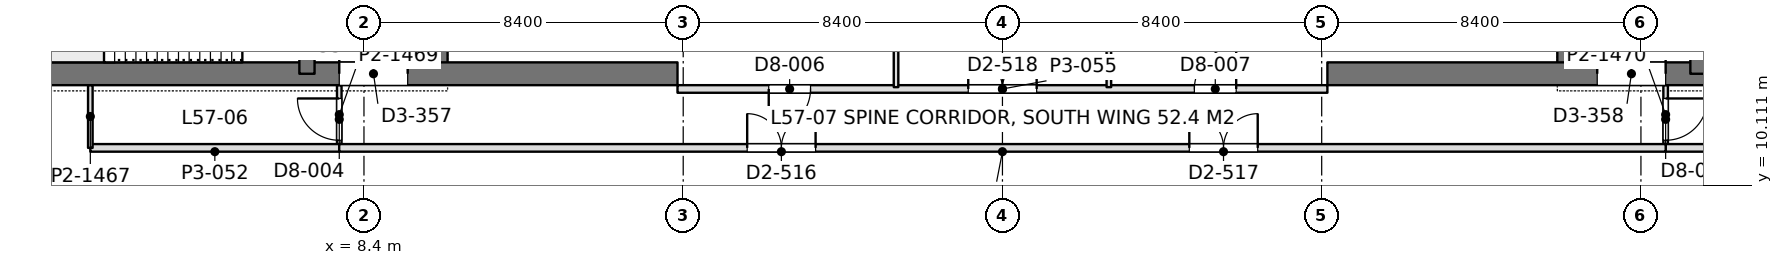
"""IFC4 building model, lengths in metres.
Left out: names, types, materials, properties, quantities, classifications, styles, units other than length and angle.
Written with IfcOpenShell. Run it as: python <this file> out.ifc"""

import sys

from ifc_helpers import new_model, si_unit, direction, frame, frame_2d, origin, place, context, subcontext, project, spatial, rectangle, extrude, element, fill, save


model = new_model("IFC4")
c1 = context("Model", 3, precision=1e-05, world=origin(), true_north=direction((0.0, 1.0)))
c2 = subcontext(c1, "Body", "Model", "MODEL_VIEW")
j1 = project(units=[si_unit("LENGTHUNIT", "METRE"), si_unit("PLANEANGLEUNIT", "RADIAN")], contexts=[c1])
p1 = place(None, origin())
s1 = spatial("IfcSite", under=j1, at=p1, CompositionType="ELEMENT")
p2 = place(p1, origin())
s2 = spatial("IfcBuilding", under=s1, at=p2, CompositionType="ELEMENT")
p3 = place(p2, frame((0.0, 0.0, 250.2)))
s3 = spatial("IfcBuildingStorey", under=s2, at=p3, CompositionType="ELEMENT", Elevation=250.2)
p4 = place(p3, frame((-1.05, 13.05, 0.0), z_axis=(0.0, 0.0, 1.0), x_axis=(1.0, 0.0, 0.0)))
e1 = element("IfcWall", 1, at=p4, inside=s3, PredefinedType="SHEAR", context=c2, shape_type="SweptSolid", body=[
    extrude(rectangle(XDim=17.7, YDim=0.6, at=frame_2d((8.85, 0.0))), origin(), (0.0, 0.0, 1.0), 4.5),
])
p5 = place(p4, frame((8.8, 0.0, 0.0)))
e2 = element("IfcOpeningElement", 2, at=p5, cuts=e1, PredefinedType="OPENING", context=c2, shape_type="SweptSolid", body=[
    extrude(rectangle(XDim=1.8, YDim=2.4, at=frame_2d((0.9, 1.2))), frame((0.0, 0.31, 0.0), z_axis=(0.0, -1.0, 0.0), x_axis=(1.0, 0.0, 0.0)), (0.0, 0.0, 1.0), 0.62),
])
p6 = place(p3, frame((6.9, 13.05, 0.0), z_axis=(0.0, 0.0, 1.0), x_axis=(0.0, 1.0, 0.0)))
e3 = element("IfcWall", 3, at=p6, inside=s3, PredefinedType="SHEAR", context=c2, shape_type="SweptSolid", body=[
    extrude(rectangle(XDim=24.3, YDim=0.4, at=frame_2d((12.15, 0.0))), origin(), (0.0, 0.0, 1.0), 4.5),
])
p7 = place(p6, frame((1.3, 0.0, 0.0)))
e4 = element("IfcOpeningElement", 4, at=p7, cuts=e3, PredefinedType="OPENING", context=c2, shape_type="SweptSolid", body=[
    extrude(rectangle(XDim=1.0, YDim=2.2, at=frame_2d((0.5, 1.1))), frame((0.0, 0.21, 0.0), z_axis=(0.0, -1.0, 0.0), x_axis=(1.0, 0.0, 0.0)), (0.0, 0.0, 1.0), 0.42),
])
p8 = place(p6, frame((22.0, 0.0, 0.0)))
e5 = element("IfcOpeningElement", 5, at=p8, cuts=e3, PredefinedType="OPENING", context=c2, shape_type="SweptSolid", body=[
    extrude(rectangle(XDim=1.0, YDim=2.2, at=frame_2d((0.5, 1.1))), frame((0.0, 0.21, 0.0), z_axis=(0.0, -1.0, 0.0), x_axis=(1.0, 0.0, 0.0)), (0.0, 0.0, 1.0), 0.42),
])
p9 = place(p6, frame((5.55, 0.0, 0.0)))
e6 = element("IfcOpeningElement", 6, at=p9, cuts=e3, PredefinedType="OPENING", context=c2, shape_type="SweptSolid", body=[
    extrude(rectangle(XDim=1.0, YDim=2.2, at=frame_2d((0.5, 1.1))), frame((0.0, 0.21, 0.0), z_axis=(0.0, -1.0, 0.0), x_axis=(1.0, 0.0, 0.0)), (0.0, 0.0, 1.0), 0.42),
])
p10 = place(p6, frame((9.55, 0.0, 0.0)))
e7 = element("IfcOpeningElement", 7, at=p10, cuts=e3, PredefinedType="OPENING", context=c2, shape_type="SweptSolid", body=[
    extrude(rectangle(XDim=1.0, YDim=2.2, at=frame_2d((0.5, 1.1))), frame((0.0, 0.21, 0.0), z_axis=(0.0, -1.0, 0.0), x_axis=(1.0, 0.0, 0.0)), (0.0, 0.0, 1.0), 0.42),
])
p11 = place(p6, frame((12.8, 0.0, 0.0)))
e8 = element("IfcOpeningElement", 8, at=p11, cuts=e3, PredefinedType="OPENING", context=c2, shape_type="SweptSolid", body=[
    extrude(rectangle(XDim=1.1, YDim=2.2, at=frame_2d((0.55, 1.1))), frame((0.0, 0.21, 0.0), z_axis=(0.0, -1.0, 0.0), x_axis=(1.0, 0.0, 0.0)), (0.0, 0.0, 1.0), 0.42),
])
p12 = place(p6, frame((15.538, 0.0, 0.0)))
e9 = element("IfcOpeningElement", 9, at=p12, cuts=e3, PredefinedType="OPENING", context=c2, shape_type="SweptSolid", body=[
    extrude(rectangle(XDim=1.1, YDim=2.2, at=frame_2d((0.55, 1.1))), frame((0.0, 0.21, 0.0), z_axis=(0.0, -1.0, 0.0), x_axis=(1.0, 0.0, 0.0)), (0.0, 0.0, 1.0), 0.42),
])
p13 = place(p6, frame((18.262, 0.0, 0.0)))
e10 = element("IfcOpeningElement", 10, at=p13, cuts=e3, PredefinedType="OPENING", context=c2, shape_type="SweptSolid", body=[
    extrude(rectangle(XDim=1.1, YDim=2.2, at=frame_2d((0.55, 1.1))), frame((0.0, 0.21, 0.0), z_axis=(0.0, -1.0, 0.0), x_axis=(1.0, 0.0, 0.0)), (0.0, 0.0, 1.0), 0.42),
])
p14 = place(p3, frame((10.4, 13.05, 0.0), z_axis=(0.0, 0.0, 1.0), x_axis=(0.0, 1.0, 0.0)))
e11 = element("IfcWall", 11, at=p14, inside=s3, PredefinedType="SHEAR", context=c2, shape_type="SweptSolid", body=[
    extrude(rectangle(XDim=24.3, YDim=0.4, at=frame_2d((12.15, 0.0))), origin(), (0.0, 0.0, 1.0), 4.5),
])
p15 = place(p14, frame((15.75, 0.0, 0.0)))
e12 = element("IfcOpeningElement", 12, at=p15, cuts=e11, PredefinedType="OPENING", context=c2, shape_type="SweptSolid", body=[
    extrude(rectangle(XDim=1.1, YDim=2.2, at=frame_2d((0.55, 1.1))), frame((0.0, 0.21, 0.0), z_axis=(0.0, -1.0, 0.0), x_axis=(1.0, 0.0, 0.0)), (0.0, 0.0, 1.0), 0.42),
])
p16 = place(p14, frame((18.6, 0.0, 0.0)))
e13 = element("IfcOpeningElement", 13, at=p16, cuts=e11, PredefinedType="OPENING", context=c2, shape_type="SweptSolid", body=[
    extrude(rectangle(XDim=1.1, YDim=2.2, at=frame_2d((0.55, 1.1))), frame((0.0, 0.21, 0.0), z_axis=(0.0, -1.0, 0.0), x_axis=(1.0, 0.0, 0.0)), (0.0, 0.0, 1.0), 0.42),
])
p17 = place(p14, frame((21.45, 0.0, 0.0)))
e14 = element("IfcOpeningElement", 14, at=p17, cuts=e11, PredefinedType="OPENING", context=c2, shape_type="SweptSolid", body=[
    extrude(rectangle(XDim=1.1, YDim=2.2, at=frame_2d((0.55, 1.1))), frame((0.0, 0.21, 0.0), z_axis=(0.0, -1.0, 0.0), x_axis=(1.0, 0.0, 0.0)), (0.0, 0.0, 1.0), 0.42),
])
p18 = place(p14, frame((6.05, 0.0, 0.0)))
e15 = element("IfcOpeningElement", 15, at=p18, cuts=e11, PredefinedType="OPENING", context=c2, shape_type="SweptSolid", body=[
    extrude(rectangle(XDim=1.8, YDim=2.4, at=frame_2d((0.9, 1.2))), frame((0.0, 0.21, 0.0), z_axis=(0.0, -1.0, 0.0), x_axis=(1.0, 0.0, 0.0)), (0.0, 0.0, 1.0), 0.42),
])
p19 = place(p14, frame((11.25, 0.0, 0.0)))
e16 = element("IfcOpeningElement", 16, at=p19, cuts=e11, PredefinedType="OPENING", context=c2, shape_type="SweptSolid", body=[
    extrude(rectangle(XDim=1.8, YDim=2.4, at=frame_2d((0.9, 1.2))), frame((0.0, 0.21, 0.0), z_axis=(0.0, -1.0, 0.0), x_axis=(1.0, 0.0, 0.0)), (0.0, 0.0, 1.0), 0.42),
])
p20 = place(p3, frame((33.75, 13.05, 0.0), z_axis=(0.0, 0.0, 1.0), x_axis=(1.0, 0.0, 0.0)))
e17 = element("IfcWall", 17, at=p20, inside=s3, PredefinedType="SHEAR", context=c2, shape_type="SweptSolid", body=[
    extrude(rectangle(XDim=17.7, YDim=0.6, at=frame_2d((8.85, 0.0))), origin(), (0.0, 0.0, 1.0), 4.5),
])
p21 = place(p20, frame((7.1, 0.0, 0.0)))
e18 = element("IfcOpeningElement", 18, at=p21, cuts=e17, PredefinedType="OPENING", context=c2, shape_type="SweptSolid", body=[
    extrude(rectangle(XDim=1.8, YDim=2.4, at=frame_2d((0.9, 1.2))), frame((0.0, 0.31, 0.0), z_axis=(0.0, -1.0, 0.0), x_axis=(1.0, 0.0, 0.0)), (0.0, 0.0, 1.0), 0.62),
])
p22 = place(p3, frame((43.5, 13.05, 0.0), z_axis=(0.0, 0.0, 1.0), x_axis=(0.0, 1.0, 0.0)))
e19 = element("IfcWall", 19, at=p22, inside=s3, PredefinedType="SHEAR", context=c2, shape_type="SweptSolid", body=[
    extrude(rectangle(XDim=24.3, YDim=0.4, at=frame_2d((12.15, 0.0))), origin(), (0.0, 0.0, 1.0), 4.5),
])
p23 = place(p22, frame((1.3, 0.0, 0.0)))
e20 = element("IfcOpeningElement", 20, at=p23, cuts=e19, PredefinedType="OPENING", context=c2, shape_type="SweptSolid", body=[
    extrude(rectangle(XDim=1.0, YDim=2.2, at=frame_2d((0.5, 1.1))), frame((0.0, 0.21, 0.0), z_axis=(0.0, -1.0, 0.0), x_axis=(1.0, 0.0, 0.0)), (0.0, 0.0, 1.0), 0.42),
])
p24 = place(p22, frame((22.0, 0.0, 0.0)))
e21 = element("IfcOpeningElement", 21, at=p24, cuts=e19, PredefinedType="OPENING", context=c2, shape_type="SweptSolid", body=[
    extrude(rectangle(XDim=1.0, YDim=2.2, at=frame_2d((0.5, 1.1))), frame((0.0, 0.21, 0.0), z_axis=(0.0, -1.0, 0.0), x_axis=(1.0, 0.0, 0.0)), (0.0, 0.0, 1.0), 0.42),
])
p25 = place(p22, frame((5.55, 0.0, 0.0)))
e22 = element("IfcOpeningElement", 22, at=p25, cuts=e19, PredefinedType="OPENING", context=c2, shape_type="SweptSolid", body=[
    extrude(rectangle(XDim=1.0, YDim=2.2, at=frame_2d((0.5, 1.1))), frame((0.0, 0.21, 0.0), z_axis=(0.0, -1.0, 0.0), x_axis=(1.0, 0.0, 0.0)), (0.0, 0.0, 1.0), 0.42),
])
p26 = place(p22, frame((9.55, 0.0, 0.0)))
e23 = element("IfcOpeningElement", 23, at=p26, cuts=e19, PredefinedType="OPENING", context=c2, shape_type="SweptSolid", body=[
    extrude(rectangle(XDim=1.0, YDim=2.2, at=frame_2d((0.5, 1.1))), frame((0.0, 0.21, 0.0), z_axis=(0.0, -1.0, 0.0), x_axis=(1.0, 0.0, 0.0)), (0.0, 0.0, 1.0), 0.42),
])
p27 = place(p22, frame((12.8, 0.0, 0.0)))
e24 = element("IfcOpeningElement", 24, at=p27, cuts=e19, PredefinedType="OPENING", context=c2, shape_type="SweptSolid", body=[
    extrude(rectangle(XDim=1.1, YDim=2.2, at=frame_2d((0.55, 1.1))), frame((0.0, 0.21, 0.0), z_axis=(0.0, -1.0, 0.0), x_axis=(1.0, 0.0, 0.0)), (0.0, 0.0, 1.0), 0.42),
])
p28 = place(p22, frame((15.538, 0.0, 0.0)))
e25 = element("IfcOpeningElement", 25, at=p28, cuts=e19, PredefinedType="OPENING", context=c2, shape_type="SweptSolid", body=[
    extrude(rectangle(XDim=1.1, YDim=2.2, at=frame_2d((0.55, 1.1))), frame((0.0, 0.21, 0.0), z_axis=(0.0, -1.0, 0.0), x_axis=(1.0, 0.0, 0.0)), (0.0, 0.0, 1.0), 0.42),
])
p29 = place(p22, frame((18.262, 0.0, 0.0)))
e26 = element("IfcOpeningElement", 26, at=p29, cuts=e19, PredefinedType="OPENING", context=c2, shape_type="SweptSolid", body=[
    extrude(rectangle(XDim=1.1, YDim=2.2, at=frame_2d((0.55, 1.1))), frame((0.0, 0.21, 0.0), z_axis=(0.0, -1.0, 0.0), x_axis=(1.0, 0.0, 0.0)), (0.0, 0.0, 1.0), 0.42),
])
p30 = place(p3, frame((40.0, 13.05, 0.0), z_axis=(0.0, 0.0, 1.0), x_axis=(0.0, 1.0, 0.0)))
e27 = element("IfcWall", 27, at=p30, inside=s3, PredefinedType="SHEAR", context=c2, shape_type="SweptSolid", body=[
    extrude(rectangle(XDim=24.3, YDim=0.4, at=frame_2d((12.15, 0.0))), origin(), (0.0, 0.0, 1.0), 4.5),
])
p31 = place(p30, frame((15.75, 0.0, 0.0)))
e28 = element("IfcOpeningElement", 28, at=p31, cuts=e27, PredefinedType="OPENING", context=c2, shape_type="SweptSolid", body=[
    extrude(rectangle(XDim=1.1, YDim=2.2, at=frame_2d((0.55, 1.1))), frame((0.0, 0.21, 0.0), z_axis=(0.0, -1.0, 0.0), x_axis=(1.0, 0.0, 0.0)), (0.0, 0.0, 1.0), 0.42),
])
p32 = place(p30, frame((18.6, 0.0, 0.0)))
e29 = element("IfcOpeningElement", 29, at=p32, cuts=e27, PredefinedType="OPENING", context=c2, shape_type="SweptSolid", body=[
    extrude(rectangle(XDim=1.1, YDim=2.2, at=frame_2d((0.55, 1.1))), frame((0.0, 0.21, 0.0), z_axis=(0.0, -1.0, 0.0), x_axis=(1.0, 0.0, 0.0)), (0.0, 0.0, 1.0), 0.42),
])
p33 = place(p30, frame((21.45, 0.0, 0.0)))
e30 = element("IfcOpeningElement", 30, at=p33, cuts=e27, PredefinedType="OPENING", context=c2, shape_type="SweptSolid", body=[
    extrude(rectangle(XDim=1.1, YDim=2.2, at=frame_2d((0.55, 1.1))), frame((0.0, 0.21, 0.0), z_axis=(0.0, -1.0, 0.0), x_axis=(1.0, 0.0, 0.0)), (0.0, 0.0, 1.0), 0.42),
])
p34 = place(p30, frame((6.05, 0.0, 0.0)))
e31 = element("IfcOpeningElement", 31, at=p34, cuts=e27, PredefinedType="OPENING", context=c2, shape_type="SweptSolid", body=[
    extrude(rectangle(XDim=1.8, YDim=2.4, at=frame_2d((0.9, 1.2))), frame((0.0, 0.21, 0.0), z_axis=(0.0, -1.0, 0.0), x_axis=(1.0, 0.0, 0.0)), (0.0, 0.0, 1.0), 0.42),
])
p35 = place(p30, frame((11.25, 0.0, 0.0)))
e32 = element("IfcOpeningElement", 32, at=p35, cuts=e27, PredefinedType="OPENING", context=c2, shape_type="SweptSolid", body=[
    extrude(rectangle(XDim=1.8, YDim=2.4, at=frame_2d((0.9, 1.2))), frame((0.0, 0.21, 0.0), z_axis=(0.0, -1.0, 0.0), x_axis=(1.0, 0.0, 0.0)), (0.0, 0.0, 1.0), 0.42),
])
p36 = place(p3, frame((7.748, 11.1, 0.0), z_axis=(0.0, 0.0, 1.0), x_axis=(1.0, 0.0, 0.0)))
e33 = element("IfcWall", 33, at=p36, inside=s3, PredefinedType="PARTITIONING", context=c2, shape_type="SweptSolid", body=[
    extrude(rectangle(XDim=34.904, YDim=0.2, at=frame_2d((17.452, 0.0))), origin(), (0.0, 0.0, 1.0), 3.8),
])
p37 = place(p36, frame((10.735, 0.0, 0.0)))
e34 = element("IfcOpeningElement", 34, at=p37, cuts=e33, PredefinedType="OPENING", context=c2, shape_type="SweptSolid", body=[
    extrude(rectangle(XDim=1.8, YDim=2.2, at=frame_2d((0.9, 1.1))), frame((0.0, 0.11, 0.0), z_axis=(0.0, -1.0, 0.0), x_axis=(1.0, 0.0, 0.0)), (0.0, 0.0, 1.0), 0.22),
])
p38 = place(p36, frame((22.369, 0.0, 0.0)))
e35 = element("IfcOpeningElement", 35, at=p38, cuts=e33, PredefinedType="OPENING", context=c2, shape_type="SweptSolid", body=[
    extrude(rectangle(XDim=1.8, YDim=2.2, at=frame_2d((0.9, 1.1))), frame((0.0, 0.11, 0.0), z_axis=(0.0, -1.0, 0.0), x_axis=(1.0, 0.0, 0.0)), (0.0, 0.0, 1.0), 0.22),
])
p39 = place(p3, frame((7.75, 11.198, 0.0), z_axis=(0.0, 0.0, 1.0), x_axis=(0.0, 1.0, 0.0)))
e36 = element("IfcWall", 36, at=p39, inside=s3, PredefinedType="PARTITIONING", context=c2, shape_type="SweptSolid", body=[
    extrude(rectangle(XDim=1.554, YDim=0.12, at=frame_2d((0.777, 0.0))), origin(), (0.0, 0.0, 1.0), 4.35),
])
p40 = place(p39, frame((0.102, 0.0, 0.0)))
e37 = element("IfcOpeningElement", 37, at=p40, cuts=e36, PredefinedType="OPENING", context=c2, shape_type="SweptSolid", body=[
    extrude(rectangle(XDim=1.1, YDim=2.4, at=frame_2d((0.55, 1.2))), frame((0.0, 0.07, 0.0), z_axis=(0.0, -1.0, 0.0), x_axis=(1.0, 0.0, 0.0)), (0.0, 0.0, 1.0), 0.14),
])
p41 = place(p3, frame((42.65, 11.198, 0.0), z_axis=(0.0, 0.0, 1.0), x_axis=(0.0, 1.0, 0.0)))
e38 = element("IfcWall", 38, at=p41, inside=s3, PredefinedType="PARTITIONING", context=c2, shape_type="SweptSolid", body=[
    extrude(rectangle(XDim=1.554, YDim=0.12, at=frame_2d((0.777, 0.0))), origin(), (0.0, 0.0, 1.0), 4.35),
])
p42 = place(p41, frame((0.102, 0.0, 0.0)))
e39 = element("IfcOpeningElement", 39, at=p42, cuts=e38, PredefinedType="OPENING", context=c2, shape_type="SweptSolid", body=[
    extrude(rectangle(XDim=1.1, YDim=2.4, at=frame_2d((0.55, 1.2))), frame((0.0, 0.07, 0.0), z_axis=(0.0, -1.0, 0.0), x_axis=(1.0, 0.0, 0.0)), (0.0, 0.0, 1.0), 0.14),
])
p43 = place(p3, frame((1.2, 11.1, 0.0), z_axis=(0.0, 0.0, 1.0), x_axis=(1.0, 0.0, 0.0)))
e40 = element("IfcWall", 40, at=p43, inside=s3, PredefinedType="PARTITIONING", context=c2, shape_type="SweptSolid", body=[
    extrude(rectangle(XDim=6.552, YDim=0.2, at=frame_2d((3.276, 0.0))), origin(), (0.0, 0.0, 1.0), 4.35),
])
p44 = place(p3, frame((1.2, 11.1, 0.0), z_axis=(0.0, 0.0, 1.0), x_axis=(0.0, 1.0, 0.0)))
e41 = element("IfcWall", 41, at=p44, inside=s3, PredefinedType="PARTITIONING", context=c2, shape_type="SweptSolid", body=[
    extrude(rectangle(XDim=1.652, YDim=0.12, at=frame_2d((0.826, 0.0))), origin(), (0.0, 0.0, 1.0), 4.35),
])
p45 = place(p3, frame((42.648, 11.1, 0.0), z_axis=(0.0, 0.0, 1.0), x_axis=(1.0, 0.0, 0.0)))
e42 = element("IfcWall", 42, at=p45, inside=s3, PredefinedType="PARTITIONING", context=c2, shape_type="SweptSolid", body=[
    extrude(rectangle(XDim=6.552, YDim=0.2, at=frame_2d((3.276, 0.0))), origin(), (0.0, 0.0, 1.0), 4.35),
])
p46 = place(p3, frame((16.65, 12.65, 0.0), z_axis=(0.0, 0.0, 1.0), x_axis=(1.0, 0.0, 0.0)))
e43 = element("IfcWall", 43, at=p46, inside=s3, PredefinedType="PARTITIONING", context=c2, shape_type="SweptSolid", body=[
    extrude(rectangle(XDim=17.1, YDim=0.2, at=frame_2d((8.55, 0.0))), origin(), (0.0, 0.0, 1.0), 3.8),
])
p47 = place(p46, frame((2.4, 0.0, 0.0)))
e44 = element("IfcOpeningElement", 44, at=p47, cuts=e43, PredefinedType="OPENING", context=c2, shape_type="SweptSolid", body=[
    extrude(rectangle(XDim=1.1, YDim=2.4, at=frame_2d((0.55, 1.2))), frame((0.0, 0.11, 0.0), z_axis=(0.0, -1.0, 0.0), x_axis=(1.0, 0.0, 0.0)), (0.0, 0.0, 1.0), 0.22),
])
p48 = place(p46, frame((7.65, 0.0, 0.0)))
e45 = element("IfcOpeningElement", 45, at=p48, cuts=e43, PredefinedType="OPENING", context=c2, shape_type="SweptSolid", body=[
    extrude(rectangle(XDim=1.8, YDim=2.2, at=frame_2d((0.9, 1.1))), frame((0.0, 0.11, 0.0), z_axis=(0.0, -1.0, 0.0), x_axis=(1.0, 0.0, 0.0)), (0.0, 0.0, 1.0), 0.22),
])
p49 = place(p46, frame((13.6, 0.0, 0.0)))
e46 = element("IfcOpeningElement", 46, at=p49, cuts=e43, PredefinedType="OPENING", context=c2, shape_type="SweptSolid", body=[
    extrude(rectangle(XDim=1.1, YDim=2.4, at=frame_2d((0.55, 1.2))), frame((0.0, 0.11, 0.0), z_axis=(0.0, -1.0, 0.0), x_axis=(1.0, 0.0, 0.0)), (0.0, 0.0, 1.0), 0.22),
])
for number, where, z_axis, x_axis in (
    (47, (22.4, 12.698, 0.0), (0.0, 0.0, 1.0), (0.0, 1.0, 0.0)),
    (48, (28.0, 12.698, 0.0), (0.0, 0.0, 1.0), (0.0, 1.0, 0.0)),
):
    element("IfcWall", number, at=place(p3, frame(where, z_axis=z_axis, x_axis=x_axis)), inside=s3, PredefinedType="PARTITIONING", context=c2, shape_type="SweptSolid", body=[
        extrude(rectangle(XDim=4.494, YDim=0.12, at=frame_2d((2.247, 0.0))), origin(), (0.0, 0.0, 1.0), 3.5),
    ])
p50 = place(p5, origin())
e49 = element("IfcDoor", 49, at=p50, inside=s3, OperationType="DOUBLE_DOOR_SINGLE_SWING", PredefinedType="DOOR", context=c2, shape_type="SweptSolid", body=[
    extrude(rectangle(XDim=1.8, YDim=2.4, at=frame_2d((0.9, 1.2))), frame((0.0, 0.025, 0.0), z_axis=(0.0, -1.0, 0.0), x_axis=(1.0, 0.0, 0.0)), (0.0, 0.0, 1.0), 0.05),
])
fill(e2, e49)
p51 = place(p21, origin())
e50 = element("IfcDoor", 50, at=p51, inside=s3, OperationType="DOUBLE_DOOR_SINGLE_SWING", PredefinedType="DOOR", context=c2, shape_type="SweptSolid", body=[
    extrude(rectangle(XDim=1.8, YDim=2.4, at=frame_2d((0.9, 1.2))), frame((0.0, 0.025, 0.0), z_axis=(0.0, -1.0, 0.0), x_axis=(1.0, 0.0, 0.0)), (0.0, 0.0, 1.0), 0.05),
])
fill(e18, e50)
p52 = place(p37, origin())
e51 = element("IfcDoor", 51, at=p52, inside=s3, OperationType="DOUBLE_DOOR_SINGLE_SWING", PredefinedType="DOOR", context=c2, shape_type="SweptSolid", body=[
    extrude(rectangle(XDim=1.8, YDim=2.2, at=frame_2d((0.9, 1.1))), frame((0.0, 0.025, 0.0), z_axis=(0.0, -1.0, 0.0), x_axis=(1.0, 0.0, 0.0)), (0.0, 0.0, 1.0), 0.05),
])
fill(e34, e51)
p53 = place(p38, origin())
e52 = element("IfcDoor", 52, at=p53, inside=s3, OperationType="DOUBLE_DOOR_SINGLE_SWING", PredefinedType="DOOR", context=c2, shape_type="SweptSolid", body=[
    extrude(rectangle(XDim=1.8, YDim=2.2, at=frame_2d((0.9, 1.1))), frame((0.0, 0.025, 0.0), z_axis=(0.0, -1.0, 0.0), x_axis=(1.0, 0.0, 0.0)), (0.0, 0.0, 1.0), 0.05),
])
fill(e35, e52)
p54 = place(p40, origin())
e53 = element("IfcDoor", 53, at=p54, inside=s3, OperationType="SINGLE_SWING_RIGHT", PredefinedType="DOOR", context=c2, shape_type="SweptSolid", body=[
    extrude(rectangle(XDim=1.1, YDim=2.4, at=frame_2d((0.55, 1.2))), frame((0.0, 0.025, 0.0), z_axis=(0.0, -1.0, 0.0), x_axis=(1.0, 0.0, 0.0)), (0.0, 0.0, 1.0), 0.05),
])
fill(e37, e53)
p55 = place(p42, frame((1.1, 0.0, 0.0), z_axis=(0.0, 0.0, 1.0), x_axis=(-1.0, 0.0, 0.0)))
e54 = element("IfcDoor", 54, at=p55, inside=s3, OperationType="SINGLE_SWING_LEFT", PredefinedType="DOOR", context=c2, shape_type="SweptSolid", body=[
    extrude(rectangle(XDim=1.1, YDim=2.4, at=frame_2d((0.55, 1.2))), frame((0.0, 0.025, 0.0), z_axis=(0.0, -1.0, 0.0), x_axis=(1.0, 0.0, 0.0)), (0.0, 0.0, 1.0), 0.05),
])
fill(e39, e54)
p56 = place(p47, frame((1.1, 0.0, 0.0), z_axis=(0.0, 0.0, 1.0), x_axis=(-1.0, 0.0, 0.0)))
e55 = element("IfcDoor", 55, at=p56, inside=s3, OperationType="SINGLE_SWING_RIGHT", PredefinedType="DOOR", context=c2, shape_type="SweptSolid", body=[
    extrude(rectangle(XDim=1.1, YDim=2.4, at=frame_2d((0.55, 1.2))), frame((0.0, 0.025, 0.0), z_axis=(0.0, -1.0, 0.0), x_axis=(1.0, 0.0, 0.0)), (0.0, 0.0, 1.0), 0.05),
])
fill(e44, e55)
p57 = place(p48, origin())
e56 = element("IfcDoor", 56, at=p57, inside=s3, OperationType="DOUBLE_DOOR_SINGLE_SWING", PredefinedType="DOOR", context=c2, shape_type="SweptSolid", body=[
    extrude(rectangle(XDim=1.8, YDim=2.2, at=frame_2d((0.9, 1.1))), frame((0.0, 0.025, 0.0), z_axis=(0.0, -1.0, 0.0), x_axis=(1.0, 0.0, 0.0)), (0.0, 0.0, 1.0), 0.05),
])
fill(e45, e56)
p58 = place(p49, origin())
e57 = element("IfcDoor", 57, at=p58, inside=s3, OperationType="SINGLE_SWING_RIGHT", PredefinedType="DOOR", context=c2, shape_type="SweptSolid", body=[
    extrude(rectangle(XDim=1.1, YDim=2.4, at=frame_2d((0.55, 1.2))), frame((0.0, 0.025, 0.0), z_axis=(0.0, -1.0, 0.0), x_axis=(1.0, 0.0, 0.0)), (0.0, 0.0, 1.0), 0.05),
])
fill(e46, e57)
save(model, sys.argv[1])
